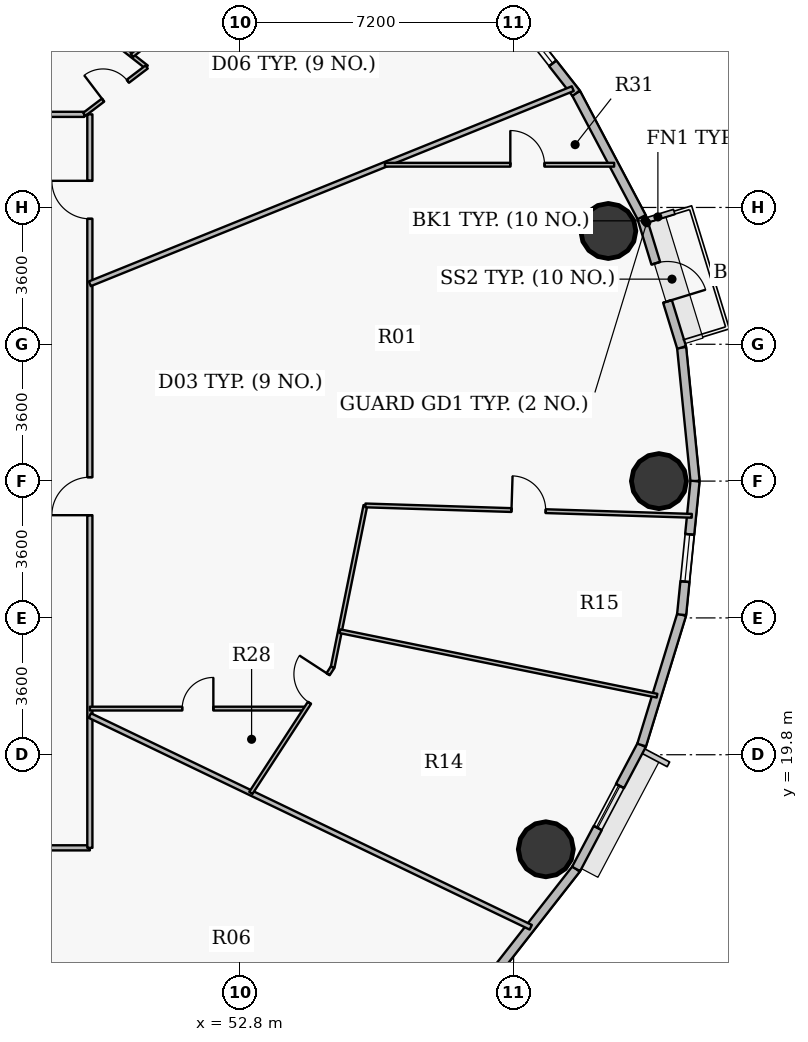
"""IFC4 building model, lengths in metres.
Left out: names, types, materials, properties, quantities, classifications, styles, units other than length and angle.
Written with IfcOpenShell. Run it as: python <this file> out.ifc"""

import sys

from ifc_helpers import new_model, si_unit, direction, frame, frame_2d, origin, origin_2d, place, context, subcontext, project, spatial, rectangle, hollow_circle, extrude, source, transform, mapped, element, fill, save


model = new_model("IFC4")
c1 = context("Model", 3, precision=1e-05, world=origin(), true_north=direction((0.0, 1.0)))
c2 = subcontext(c1, "Body", "Model", "MODEL_VIEW")
j1 = project(units=[si_unit("LENGTHUNIT", "METRE"), si_unit("PLANEANGLEUNIT", "RADIAN")], contexts=[c1])
p1 = place(None, origin())
s1 = spatial("IfcSite", under=j1, at=p1, CompositionType="ELEMENT")
p2 = place(p1, origin())
s2 = spatial("IfcBuilding", under=s1, at=p2, CompositionType="ELEMENT")
p3 = place(p2, frame((0.0, 0.0, 100.95)))
s3 = spatial("IfcBuildingStorey", under=s2, at=p3, CompositionType="ELEMENT", Elevation=100.95)
for number, where, z_axis, x_axis in (
    (1, (63.825, 27.0, 0.0), (0.0, 0.0, 1.0), (1.0, 0.0, 0.0)),
    (2, (62.493, 33.581, 0.0), (0.0, 0.0, 1.0), (1.0, 0.0, 0.0)),
    (3, (60.849, 17.312, 0.0), (0.0, 0.0, 1.0), (1.0, 0.0, 0.0)),
):
    element("IfcColumn", number, at=place(p3, frame(where, z_axis=z_axis, x_axis=x_axis)), inside=s3, PredefinedType="COLUMN", context=c2, shape_type="SweptSolid", body=[
        extrude(hollow_circle(Radius=0.725, WallThickness=0.042, at=origin_2d()), origin(), (0.0, 0.0, 1.0), 3.75),
    ])
p4 = place(p3, frame((64.422, 30.515, 0.0), z_axis=(0.0, 0.0, 1.0), x_axis=(0.099989468229, -0.994988495533, 0.0)))
e4 = element("IfcWall", 4, at=p4, inside=s3, PredefinedType="SOLIDWALL", context=c2, shape_type="SweptSolid", body=[
    extrude(rectangle(XDim=3.533, YDim=0.24, at=frame_2d((1.767, 0.0))), origin(), (0.0, 0.0, 1.0), 3.5),
])
p5 = place(p3, frame((63.37, 33.945, 0.0), z_axis=(0.0, 0.0, 1.0), x_axis=(0.293124431344, -0.956074300329, 0.0)))
e5 = element("IfcWall", 5, at=p5, inside=s3, PredefinedType="SOLIDWALL", context=c2, shape_type="SweptSolid", body=[
    extrude(rectangle(XDim=3.587, YDim=0.24, at=frame_2d((1.793, 0.0))), origin(), (0.0, 0.0, 1.0), 3.5),
])
p6 = place(p5, frame((1.269, 0.0, 0.0)))
e6 = element("IfcOpeningElement", 6, at=p6, cuts=e5, PredefinedType="OPENING", context=c2, shape_type="SweptSolid", body=[
    extrude(rectangle(XDim=1.05, YDim=2.15, at=origin_2d()), frame((0.525, 0.13, 1.075), z_axis=(0.0, -1.0, 0.0), x_axis=(1.0, 0.0, 0.0)), (0.0, 0.0, 1.0), 0.26),
])
p7 = place(p3, frame((61.645, 37.206, 0.0), z_axis=(0.0, 0.0, 1.0), x_axis=(0.467614004126, -0.883932770716, 0.0)))
e7 = element("IfcWall", 7, at=p7, inside=s3, PredefinedType="SOLIDWALL", context=c2, shape_type="SweptSolid", body=[
    extrude(rectangle(XDim=3.689, YDim=0.24, at=frame_2d((1.844, 0.0))), origin(), (0.0, 0.0, 1.0), 3.5),
])
p8 = place(p3, frame((59.289, 40.217, 0.0), z_axis=(0.0, 0.0, 1.0), x_axis=(0.616272103517, -0.787533297345, 0.0)))
e8 = element("IfcWall", 8, at=p8, inside=s3, PredefinedType="SOLIDWALL", context=c2, shape_type="SweptSolid", body=[
    extrude(rectangle(XDim=3.823, YDim=0.24, at=frame_2d((1.912, 0.0))), origin(), (0.0, 0.0, 1.0), 3.5),
])
p9 = place(p8, frame((0.824, 0.0, 0.9)))
e9 = element("IfcOpeningElement", 9, at=p9, cuts=e8, PredefinedType="OPENING", context=c2, shape_type="SweptSolid", body=[
    extrude(rectangle(XDim=2.0, YDim=1.75, at=origin_2d()), frame((1.0, 0.13, 0.875), z_axis=(0.0, -1.0, 0.0), x_axis=(1.0, 0.0, 0.0)), (0.0, 0.0, 1.0), 0.26),
])
p10 = place(p3, frame((61.645, 16.794, 0.0), z_axis=(0.0, 0.0, 1.0), x_axis=(-0.616272103517, -0.787533297345, 0.0)))
e10 = element("IfcWall", 10, at=p10, inside=s3, PredefinedType="SOLIDWALL", context=c2, shape_type="SweptSolid", body=[
    extrude(rectangle(XDim=3.823, YDim=0.24, at=frame_2d((1.912, 0.0))), origin(), (0.0, 0.0, 1.0), 3.5),
])
p11 = place(p3, frame((63.37, 20.055, 0.0), z_axis=(0.0, 0.0, 1.0), x_axis=(-0.467614004126, -0.883932770716, 0.0)))
e11 = element("IfcWall", 11, at=p11, inside=s3, PredefinedType="SOLIDWALL", context=c2, shape_type="SweptSolid", body=[
    extrude(rectangle(XDim=3.689, YDim=0.24, at=frame_2d((1.844, 0.0))), origin(), (0.0, 0.0, 1.0), 3.5),
])
p12 = place(p11, frame((1.219, 0.0, 0.9)))
e12 = element("IfcOpeningElement", 12, at=p12, cuts=e11, PredefinedType="OPENING", context=c2, shape_type="SweptSolid", body=[
    extrude(rectangle(XDim=1.25, YDim=1.65, at=origin_2d()), frame((0.625, 0.13, 0.825), z_axis=(0.0, -1.0, 0.0), x_axis=(1.0, 0.0, 0.0)), (0.0, 0.0, 1.0), 0.26),
])
p13 = place(p3, frame((64.422, 23.485, 0.0), z_axis=(0.0, 0.0, 1.0), x_axis=(-0.293124431344, -0.956074300329, 0.0)))
e13 = element("IfcWall", 13, at=p13, inside=s3, PredefinedType="SOLIDWALL", context=c2, shape_type="SweptSolid", body=[
    extrude(rectangle(XDim=3.587, YDim=0.24, at=frame_2d((1.793, 0.0))), origin(), (0.0, 0.0, 1.0), 3.5),
])
p14 = place(p3, frame((64.775, 27.0, 0.0), z_axis=(0.0, 0.0, 1.0), x_axis=(-0.099989468229, -0.994988495533, 0.0)))
e14 = element("IfcWall", 14, at=p14, inside=s3, PredefinedType="SOLIDWALL", context=c2, shape_type="SweptSolid", body=[
    extrude(rectangle(XDim=3.533, YDim=0.24, at=frame_2d((1.767, 0.0))), origin(), (0.0, 0.0, 1.0), 3.5),
])
p15 = place(p14, frame((1.408, 0.0, 0.9)))
e15 = element("IfcOpeningElement", 15, at=p15, cuts=e14, PredefinedType="OPENING", context=c2, shape_type="SweptSolid", body=[
    extrude(rectangle(XDim=1.25, YDim=1.65, at=origin_2d()), frame((0.625, 0.13, 0.825), z_axis=(0.0, -1.0, 0.0), x_axis=(1.0, 0.0, 0.0)), (0.0, 0.0, 1.0), 0.26),
])
p16 = place(p3, frame((34.795, 17.35, 0.0), z_axis=(0.0, 0.0, 1.0), x_axis=(1.0, 0.0, 0.0)))
e16 = element("IfcWall", 16, at=p16, inside=s3, PredefinedType="PARTITIONING", context=c2, shape_type="SweptSolid", body=[
    extrude(rectangle(XDim=14.055, YDim=0.135, at=frame_2d((7.028, 0.0))), origin(), (0.0, 0.0, 1.0), 2.935),
])
p17 = place(p16, frame((1.571, 0.0, 0.0)))
e17 = element("IfcOpeningElement", 17, at=p17, cuts=e16, PredefinedType="OPENING", context=c2, shape_type="SweptSolid", body=[
    extrude(rectangle(XDim=1.0, YDim=2.15, at=origin_2d()), frame((0.5, 0.078, 1.075), z_axis=(0.0, -1.0, 0.0), x_axis=(1.0, 0.0, 0.0)), (0.0, 0.0, 1.0), 0.155),
])
p18 = place(p16, frame((10.976, 0.0, 0.0)))
e18 = element("IfcOpeningElement", 18, at=p18, cuts=e16, PredefinedType="OPENING", context=c2, shape_type="SweptSolid", body=[
    extrude(rectangle(XDim=1.0, YDim=2.15, at=origin_2d()), frame((0.5, 0.078, 1.075), z_axis=(0.0, -1.0, 0.0), x_axis=(1.0, 0.0, 0.0)), (0.0, 0.0, 1.0), 0.155),
])
p19 = place(p3, frame((37.205, 36.65, 0.0), z_axis=(0.0, 0.0, 1.0), x_axis=(1.0, 0.0, 0.0)))
e19 = element("IfcWall", 19, at=p19, inside=s3, PredefinedType="PARTITIONING", context=c2, shape_type="SweptSolid", body=[
    extrude(rectangle(XDim=11.499, YDim=0.135, at=frame_2d((5.75, 0.0))), origin(), (0.0, 0.0, 1.0), 2.935),
])
p20 = place(p19, frame((3.988, 0.0, 0.0)))
e20 = element("IfcOpeningElement", 20, at=p20, cuts=e19, PredefinedType="OPENING", context=c2, shape_type="SweptSolid", body=[
    extrude(rectangle(XDim=1.0, YDim=2.15, at=origin_2d()), frame((0.5, 0.078, 1.075), z_axis=(0.0, -1.0, 0.0), x_axis=(1.0, 0.0, 0.0)), (0.0, 0.0, 1.0), 0.155),
])
p21 = place(p3, frame((43.42, 36.65, 0.0), z_axis=(0.0, 0.0, 1.0), x_axis=(0.609572126114, 0.792730611913, 0.0)))
e21 = element("IfcWall", 21, at=p21, inside=s3, PredefinedType="PARTITIONING", context=c2, shape_type="SweptSolid", body=[
    extrude(rectangle(XDim=12.086, YDim=0.135, at=frame_2d((6.043, 0.0))), origin(), (0.0, 0.0, 1.0), 2.935),
])
p22 = place(p3, frame((47.891, 39.816, 0.0), z_axis=(0.0, 0.0, 1.0), x_axis=(0.787339621997, -0.616519520887, 0.0)))
e22 = element("IfcWall", 22, at=p22, inside=s3, PredefinedType="PARTITIONING", context=c2, shape_type="SweptSolid", body=[
    extrude(rectangle(XDim=3.116, YDim=0.1, at=frame_2d((1.558, 0.0))), origin(), (0.0, 0.0, 1.0), 2.935),
])
p23 = place(p3, frame((48.704, 36.65, 0.0), z_axis=(0.0, 0.0, 1.0), x_axis=(0.796299280247, 0.604902848628, 0.0)))
e23 = element("IfcWall", 23, at=p23, inside=s3, PredefinedType="PARTITIONING", context=c2, shape_type="SweptSolid", body=[
    extrude(rectangle(XDim=2.059, YDim=0.1, at=frame_2d((1.029, 0.0))), origin(), (0.0, 0.0, 1.0), 2.935),
])
p24 = place(p23, frame((0.619, 0.0, 0.0)))
e24 = element("IfcOpeningElement", 24, at=p24, cuts=e23, PredefinedType="OPENING", context=c2, shape_type="SweptSolid", body=[
    extrude(rectangle(XDim=0.82, YDim=2.1, at=origin_2d()), frame((0.41, 0.06, 1.05), z_axis=(0.0, -1.0, 0.0), x_axis=(1.0, 0.0, 0.0)), (0.0, 0.0, 1.0), 0.12),
])
p25 = place(p3, frame((48.85, 17.35, 0.0), z_axis=(0.0, 0.0, 1.0), x_axis=(0.0, 1.0, 0.0)))
e25 = element("IfcWall", 25, at=p25, inside=s3, PredefinedType="PARTITIONING", context=c2, shape_type="SweptSolid", body=[
    extrude(rectangle(XDim=19.3, YDim=0.135, at=frame_2d((9.65, 0.0))), origin(), (0.0, 0.0, 1.0), 2.935),
])
p26 = place(p25, frame((16.551, 0.0, 0.0)))
e26 = element("IfcOpeningElement", 26, at=p26, cuts=e25, PredefinedType="OPENING", context=c2, shape_type="SweptSolid", body=[
    extrude(rectangle(XDim=1.0, YDim=2.15, at=origin_2d()), frame((0.5, 0.078, 1.075), z_axis=(0.0, -1.0, 0.0), x_axis=(1.0, 0.0, 0.0)), (0.0, 0.0, 1.0), 0.155),
])
p27 = place(p25, frame((8.753, 0.0, 0.0)))
e27 = element("IfcOpeningElement", 27, at=p27, cuts=e25, PredefinedType="OPENING", context=c2, shape_type="SweptSolid", body=[
    extrude(rectangle(XDim=1.0, YDim=2.15, at=origin_2d()), frame((0.5, 0.078, 1.075), z_axis=(0.0, -1.0, 0.0), x_axis=(1.0, 0.0, 0.0)), (0.0, 0.0, 1.0), 0.155),
])
p28 = place(p3, frame((48.85, 20.83, 0.0), z_axis=(0.0, 0.0, 1.0), x_axis=(0.901472427533, -0.432836530803, 0.0)))
e28 = element("IfcWall", 28, at=p28, inside=s3, PredefinedType="PARTITIONING", context=c2, shape_type="SweptSolid", body=[
    extrude(rectangle(XDim=12.869, YDim=0.135, at=frame_2d((6.434, 0.0))), origin(), (0.0, 0.0, 1.0), 2.935),
])
p29 = place(p3, frame((48.85, 21.014, 0.0), z_axis=(0.0, 0.0, 1.0), x_axis=(1.0, 0.0, 0.0)))
e29 = element("IfcWall", 29, at=p29, inside=s3, PredefinedType="PARTITIONING", context=c2, shape_type="SweptSolid", body=[
    extrude(rectangle(XDim=5.68, YDim=0.1, at=frame_2d((2.84, 0.0))), origin(), (0.0, 0.0, 1.0), 2.935),
])
p30 = place(p29, frame((2.43, 0.0, 0.0)))
e30 = element("IfcOpeningElement", 30, at=p30, cuts=e29, PredefinedType="OPENING", context=c2, shape_type="SweptSolid", body=[
    extrude(rectangle(XDim=0.82, YDim=2.1, at=origin_2d()), frame((0.41, 0.06, 1.05), z_axis=(0.0, -1.0, 0.0), x_axis=(1.0, 0.0, 0.0)), (0.0, 0.0, 1.0), 0.12),
])
p31 = place(p3, frame((48.85, 32.192, 0.0), z_axis=(0.0, 0.0, 1.0), x_axis=(0.927181163505, 0.374613253958, 0.0)))
e31 = element("IfcWall", 31, at=p31, inside=s3, PredefinedType="PARTITIONING", context=c2, shape_type="SweptSolid", body=[
    extrude(rectangle(XDim=13.706, YDim=0.135, at=frame_2d((6.853, 0.0))), origin(), (0.0, 0.0, 1.0), 2.935),
])
p32 = place(p3, frame((49.956, 38.198, 0.0), z_axis=(0.0, 0.0, 1.0), x_axis=(0.78000622602, 0.625771753413, 0.0)))
e32 = element("IfcWall", 32, at=p32, inside=s3, PredefinedType="PARTITIONING", context=c2, shape_type="SweptSolid", body=[
    extrude(rectangle(XDim=2.045, YDim=0.1, at=frame_2d((1.022, 0.0))), origin(), (0.0, 0.0, 1.0), 3.035),
])
p33 = place(p3, frame((53.087, 18.796, 0.0), z_axis=(0.0, 0.0, 1.0), x_axis=(0.545403476424, 0.838173638278, 0.0)))
e33 = element("IfcWall", 33, at=p33, inside=s3, PredefinedType="PARTITIONING", context=c2, shape_type="SweptSolid", body=[
    extrude(rectangle(XDim=3.948, YDim=0.1, at=frame_2d((1.974, 0.0))), origin(), (0.0, 0.0, 1.0), 2.935),
])
p34 = place(p33, frame((2.827, 0.0, 0.0)))
e34 = element("IfcOpeningElement", 34, at=p34, cuts=e33, PredefinedType="OPENING", context=c2, shape_type="SweptSolid", body=[
    extrude(rectangle(XDim=0.9, YDim=2.1, at=origin_2d()), frame((0.45, 0.06, 1.05), z_axis=(0.0, -1.0, 0.0), x_axis=(1.0, 0.0, 0.0)), (0.0, 0.0, 1.0), 0.12),
])
p35 = place(p3, frame((55.24, 22.105, 0.0), z_axis=(0.0, 0.0, 1.0), x_axis=(0.198113230311, 0.980179140757, 0.0)))
e35 = element("IfcWall", 35, at=p35, inside=s3, PredefinedType="PARTITIONING", context=c2, shape_type="SweptSolid", body=[
    extrude(rectangle(XDim=0.964, YDim=0.1, at=frame_2d((0.482, 0.0))), origin(), (0.0, 0.0, 1.0), 3.5),
])
p36 = place(p3, frame((55.433, 23.059, 0.0), z_axis=(0.0, 0.0, 1.0), x_axis=(0.198276597798, 0.980146106846, 0.0)))
e36 = element("IfcWall", 36, at=p36, inside=s3, PredefinedType="PARTITIONING", context=c2, shape_type="SweptSolid", body=[
    extrude(rectangle(XDim=3.368, YDim=0.1, at=frame_2d((1.684, 0.0))), origin(), (0.0, 0.0, 1.0), 3.5),
])
p37 = place(p3, frame((55.431, 23.05, 0.0), z_axis=(0.0, 0.0, 1.0), x_axis=(0.979953651871, -0.199225601228, 0.0)))
e37 = element("IfcWall", 37, at=p37, inside=s3, PredefinedType="PARTITIONING", context=c2, shape_type="SweptSolid", body=[
    extrude(rectangle(XDim=8.513, YDim=0.1, at=frame_2d((4.257, 0.0))), origin(), (0.0, 0.0, 1.0), 2.935),
])
p38 = place(p3, frame((56.101, 26.36, 0.0), z_axis=(0.0, 0.0, 1.0), x_axis=(0.999493466978, -0.031824667605, 0.0)))
e38 = element("IfcWall", 38, at=p38, inside=s3, PredefinedType="PARTITIONING", context=c2, shape_type="SweptSolid", body=[
    extrude(rectangle(XDim=8.592, YDim=0.1, at=frame_2d((4.296, 0.0))), origin(), (0.0, 0.0, 1.0), 2.935),
])
p39 = place(p38, frame((3.846, 0.0, 0.0)))
e39 = element("IfcOpeningElement", 39, at=p39, cuts=e38, PredefinedType="OPENING", context=c2, shape_type="SweptSolid", body=[
    extrude(rectangle(XDim=0.9, YDim=2.1, at=origin_2d()), frame((0.45, 0.06, 1.05), z_axis=(0.0, -1.0, 0.0), x_axis=(1.0, 0.0, 0.0)), (0.0, 0.0, 1.0), 0.12),
])
p40 = place(p3, frame((56.615, 35.324, 0.0), z_axis=(0.0, 0.0, 1.0), x_axis=(1.0, 0.0, 0.0)))
e40 = element("IfcWall", 40, at=p40, inside=s3, PredefinedType="PARTITIONING", context=c2, shape_type="SweptSolid", body=[
    extrude(rectangle(XDim=6.031, YDim=0.1, at=frame_2d((3.016, 0.0))), origin(), (0.0, 0.0, 1.0), 2.935),
])
p41 = place(p40, frame((3.3, 0.0, 0.0)))
e41 = element("IfcOpeningElement", 41, at=p41, cuts=e40, PredefinedType="OPENING", context=c2, shape_type="SweptSolid", body=[
    extrude(rectangle(XDim=0.9, YDim=2.1, at=origin_2d()), frame((0.45, 0.06, 1.05), z_axis=(0.0, -1.0, 0.0), x_axis=(1.0, 0.0, 0.0)), (0.0, 0.0, 1.0), 0.12),
])
m1 = source(origin(), c2, "Body", "SweptSolid", [
    extrude(rectangle(XDim=1.05, YDim=2.15, at=origin_2d()), frame((0.525, 0.025, 1.075), z_axis=(0.0, -1.0, 0.0), x_axis=(1.0, 0.0, 0.0)), (0.0, 0.0, 1.0), 0.05),
])
p42 = place(p6, origin())
e42 = element("IfcDoor", 42, at=p42, inside=s3, OperationType="SINGLE_SWING_RIGHT", PredefinedType="DOOR", context=c2, shape_type="MappedRepresentation", body=[
    mapped(m1, transform((0.0, 0.0, 0.0), x_axis=(1.0, 0.0, 0.0), y_axis=(0.0, 1.0, 0.0), z_axis=(0.0, 0.0, 1.0), scale=1.0)),
])
fill(e6, e42)
m2 = source(origin(), c2, "Body", "SweptSolid", [
    extrude(rectangle(XDim=2.0, YDim=1.75, at=origin_2d()), frame((1.0, 0.03, 0.875), z_axis=(0.0, -1.0, 0.0), x_axis=(1.0, 0.0, 0.0)), (0.0, 0.0, 1.0), 0.06),
])
p43 = place(p9, origin())
e43 = element("IfcWindow", 43, at=p43, inside=s3, PartitioningType="DOUBLE_PANEL_VERTICAL", PredefinedType="WINDOW", context=c2, shape_type="MappedRepresentation", body=[
    mapped(m2, transform((0.0, 0.0, 0.0), x_axis=(1.0, 0.0, 0.0), y_axis=(0.0, 1.0, 0.0), z_axis=(0.0, 0.0, 1.0), scale=1.0)),
])
fill(e9, e43)
m3 = source(origin(), c2, "Body", "SweptSolid", [
    extrude(rectangle(XDim=1.25, YDim=1.65, at=origin_2d()), frame((0.625, 0.03, 0.825), z_axis=(0.0, -1.0, 0.0), x_axis=(1.0, 0.0, 0.0)), (0.0, 0.0, 1.0), 0.06),
])
p44 = place(p15, origin())
e44 = element("IfcWindow", 44, at=p44, inside=s3, PartitioningType="SINGLE_PANEL", PredefinedType="WINDOW", context=c2, shape_type="MappedRepresentation", body=[
    mapped(m3, transform((0.0, 0.0, 0.0), x_axis=(1.0, 0.0, 0.0), y_axis=(0.0, 1.0, 0.0), z_axis=(0.0, 0.0, 1.0), scale=1.0)),
])
fill(e15, e44)
p45 = place(p12, origin())
e45 = element("IfcWindow", 45, at=p45, inside=s3, PartitioningType="SINGLE_PANEL", PredefinedType="WINDOW", context=c2, shape_type="MappedRepresentation", body=[
    mapped(m3, transform((0.0, 0.0, 0.0), x_axis=(1.0, 0.0, 0.0), y_axis=(0.0, 1.0, 0.0), z_axis=(0.0, 0.0, 1.0), scale=1.0)),
])
fill(e12, e45)
m4 = source(origin(), c2, "Body", "SweptSolid", [
    extrude(rectangle(XDim=1.0, YDim=2.15, at=origin_2d()), frame((0.5, 0.025, 1.075), z_axis=(0.0, -1.0, 0.0), x_axis=(1.0, 0.0, 0.0)), (0.0, 0.0, 1.0), 0.05),
])
p46 = place(p26, origin())
e46 = element("IfcDoor", 46, at=p46, inside=s3, OperationType="SINGLE_SWING_RIGHT", PredefinedType="DOOR", context=c2, shape_type="MappedRepresentation", body=[
    mapped(m4, transform((0.0, 0.0, 0.0), x_axis=(1.0, 0.0, 0.0), y_axis=(0.0, 1.0, 0.0), z_axis=(0.0, 0.0, 1.0), scale=1.0)),
])
fill(e26, e46)
m5 = source(origin(), c2, "Body", "SweptSolid", [
    extrude(rectangle(XDim=0.82, YDim=2.1, at=origin_2d()), frame((0.41, 0.025, 1.05), z_axis=(0.0, -1.0, 0.0), x_axis=(1.0, 0.0, 0.0)), (0.0, 0.0, 1.0), 0.05),
])
p47 = place(p24, origin())
e47 = element("IfcDoor", 47, at=p47, inside=s3, OperationType="SINGLE_SWING_LEFT", PredefinedType="DOOR", context=c2, shape_type="MappedRepresentation", body=[
    mapped(m5, transform((0.0, 0.0, 0.0), x_axis=(1.0, 0.0, 0.0), y_axis=(0.0, 1.0, 0.0), z_axis=(0.0, 0.0, 1.0), scale=1.0)),
])
fill(e24, e47)
p48 = place(p27, origin())
e48 = element("IfcDoor", 48, at=p48, inside=s3, OperationType="SINGLE_SWING_LEFT", PredefinedType="DOOR", context=c2, shape_type="MappedRepresentation", body=[
    mapped(m4, transform((0.0, 0.0, 0.0), x_axis=(1.0, 0.0, 0.0), y_axis=(0.0, 1.0, 0.0), z_axis=(0.0, 0.0, 1.0), scale=1.0)),
])
fill(e27, e48)
m6 = source(origin(), c2, "Body", "SweptSolid", [
    extrude(rectangle(XDim=0.9, YDim=2.1, at=origin_2d()), frame((0.45, 0.025, 1.05), z_axis=(0.0, -1.0, 0.0), x_axis=(1.0, 0.0, 0.0)), (0.0, 0.0, 1.0), 0.05),
])
p49 = place(p34, origin())
e49 = element("IfcDoor", 49, at=p49, inside=s3, OperationType="SINGLE_SWING_RIGHT", PredefinedType="DOOR", context=c2, shape_type="MappedRepresentation", body=[
    mapped(m6, transform((0.0, 0.0, 0.0), x_axis=(1.0, 0.0, 0.0), y_axis=(0.0, 1.0, 0.0), z_axis=(0.0, 0.0, 1.0), scale=1.0)),
])
fill(e34, e49)
p50 = place(p39, origin())
e50 = element("IfcDoor", 50, at=p50, inside=s3, OperationType="SINGLE_SWING_LEFT", PredefinedType="DOOR", context=c2, shape_type="MappedRepresentation", body=[
    mapped(m6, transform((0.0, 0.0, 0.0), x_axis=(1.0, 0.0, 0.0), y_axis=(0.0, 1.0, 0.0), z_axis=(0.0, 0.0, 1.0), scale=1.0)),
])
fill(e39, e50)
p51 = place(p30, origin())
e51 = element("IfcDoor", 51, at=p51, inside=s3, OperationType="SINGLE_SWING_RIGHT", PredefinedType="DOOR", context=c2, shape_type="MappedRepresentation", body=[
    mapped(m5, transform((0.0, 0.0, 0.0), x_axis=(1.0, 0.0, 0.0), y_axis=(0.0, 1.0, 0.0), z_axis=(0.0, 0.0, 1.0), scale=1.0)),
])
fill(e30, e51)
p52 = place(p41, origin())
e52 = element("IfcDoor", 52, at=p52, inside=s3, OperationType="SINGLE_SWING_LEFT", PredefinedType="DOOR", context=c2, shape_type="MappedRepresentation", body=[
    mapped(m6, transform((0.0, 0.0, 0.0), x_axis=(1.0, 0.0, 0.0), y_axis=(0.0, 1.0, 0.0), z_axis=(0.0, 0.0, 1.0), scale=1.0)),
])
fill(e41, e52)
save(model, sys.argv[1])
